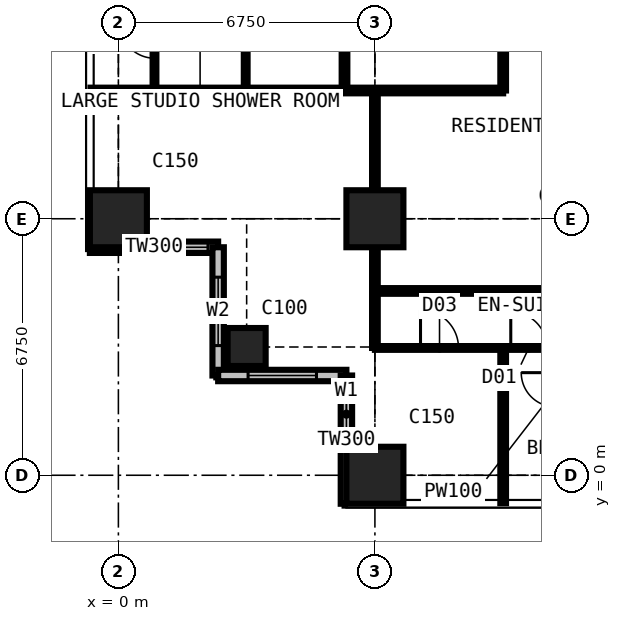
"""IFC4 building model, lengths in metres.
Left out: names, types, materials, properties, quantities, classifications, styles, units other than length and angle.
Written with IfcOpenShell. Run it as: python <this file> out.ifc"""

import sys

from ifc_helpers import new_model, si_unit, direction, frame, frame_2d, origin, origin_2d, place, context, subcontext, project, spatial, rectangle, extrude, element, fill, save


model = new_model("IFC4")
c1 = context("Model", 3, precision=1e-05, world=origin(), true_north=direction((0.0, 1.0)))
c2 = subcontext(c1, "Body", "Model", "MODEL_VIEW")
j1 = project(units=[si_unit("LENGTHUNIT", "METRE"), si_unit("PLANEANGLEUNIT", "RADIAN")], contexts=[c1])
p1 = place(None, origin())
s1 = spatial("IfcSite", under=j1, at=p1, CompositionType="ELEMENT")
p2 = place(p1, origin())
s2 = spatial("IfcBuilding", under=s1, at=p2, CompositionType="ELEMENT")
p3 = place(p2, frame((0.0, 0.0, 119.7)))
s3 = spatial("IfcBuildingStorey", under=s2, at=p3, CompositionType="ELEMENT", Elevation=119.7)
p4 = place(p3, frame((0.0, 6.75, 0.0), z_axis=(0.0, 0.0, 1.0), x_axis=(1.0, 0.0, 0.0)))
e1 = element("IfcColumn", 1, at=p4, inside=s3, PredefinedType="COLUMN", context=c2, shape_type="SweptSolid", body=[
    extrude(rectangle(XDim=1.5, YDim=1.5, at=origin_2d()), origin(), (0.0, 0.0, 1.0), 3.6),
])
p5 = place(p3, frame((3.375, 3.375, 0.0), z_axis=(0.0, 0.0, 1.0), x_axis=(1.0, 0.0, 0.0)))
e2 = element("IfcColumn", 2, at=p5, inside=s3, PredefinedType="COLUMN", context=c2, shape_type="SweptSolid", body=[
    extrude(rectangle(XDim=1.0, YDim=1.0, at=origin_2d()), origin(), (0.0, 0.0, 1.0), 3.6),
])
for number, where, z_axis, x_axis in (
    (3, (6.75, 0.0, 0.0), (0.0, 0.0, 1.0), (1.0, 0.0, 0.0)),
    (4, (6.75, 6.75, 0.0), (0.0, 0.0, 1.0), (1.0, 0.0, 0.0)),
):
    element("IfcColumn", number, at=place(p3, frame(where, z_axis=z_axis, x_axis=x_axis)), inside=s3, PredefinedType="COLUMN", context=c2, shape_type="SweptSolid", body=[
        extrude(rectangle(XDim=1.5, YDim=1.5, at=origin_2d()), origin(), (0.0, 0.0, 1.0), 3.6),
    ])
p6 = place(p3, frame((-0.75, 6.0, 0.0), z_axis=(0.0, 0.0, 1.0), x_axis=(1.0, 0.0, 0.0)))
e5 = element("IfcWall", 5, at=p6, inside=s3, PredefinedType="SOLIDWALL", context=c2, shape_type="SweptSolid", body=[
    extrude(rectangle(XDim=3.375, YDim=0.3, at=frame_2d((1.688, 0.0))), origin(), (0.0, 0.0, 1.0), 3.375),
])
p7 = place(p6, frame((1.607, 0.0, 0.9)))
e6 = element("IfcOpeningElement", 6, at=p7, cuts=e5, PredefinedType="OPENING", context=c2, shape_type="SweptSolid", body=[
    extrude(rectangle(XDim=1.5, YDim=1.8, at=frame_2d((0.75, 0.9))), frame((0.0, 0.16, 0.0), z_axis=(0.0, -1.0, 0.0), x_axis=(1.0, 0.0, 0.0)), (0.0, 0.0, 1.0), 0.32),
])
p8 = place(p3, frame((2.625, 6.0, 0.0), z_axis=(0.0, 0.0, 1.0), x_axis=(0.0, -1.0, 0.0)))
e7 = element("IfcWall", 7, at=p8, inside=s3, PredefinedType="SOLIDWALL", context=c2, shape_type="SweptSolid", body=[
    extrude(rectangle(XDim=3.375, YDim=0.3, at=frame_2d((1.688, 0.0))), origin(), (0.0, 0.0, 1.0), 3.375),
])
p9 = place(p8, frame((0.788, 0.0, 0.6)))
e8 = element("IfcOpeningElement", 8, at=p9, cuts=e7, PredefinedType="OPENING", context=c2, shape_type="SweptSolid", body=[
    extrude(rectangle(XDim=1.8, YDim=2.1, at=frame_2d((0.9, 1.05))), frame((0.0, 0.16, 0.0), z_axis=(0.0, -1.0, 0.0), x_axis=(1.0, 0.0, 0.0)), (0.0, 0.0, 1.0), 0.32),
])
p10 = place(p3, frame((2.625, 2.625, 0.0), z_axis=(0.0, 0.0, 1.0), x_axis=(1.0, 0.0, 0.0)))
e9 = element("IfcWall", 9, at=p10, inside=s3, PredefinedType="SOLIDWALL", context=c2, shape_type="SweptSolid", body=[
    extrude(rectangle(XDim=3.375, YDim=0.3, at=frame_2d((1.688, 0.0))), origin(), (0.0, 0.0, 1.0), 3.375),
])
p11 = place(p10, frame((0.788, 0.0, 0.6)))
e10 = element("IfcOpeningElement", 10, at=p11, cuts=e9, PredefinedType="OPENING", context=c2, shape_type="SweptSolid", body=[
    extrude(rectangle(XDim=1.8, YDim=2.1, at=frame_2d((0.9, 1.05))), frame((0.0, 0.16, 0.0), z_axis=(0.0, -1.0, 0.0), x_axis=(1.0, 0.0, 0.0)), (0.0, 0.0, 1.0), 0.32),
])
p12 = place(p3, frame((6.0, 2.625, 0.0), z_axis=(0.0, 0.0, 1.0), x_axis=(0.0, -1.0, 0.0)))
e11 = element("IfcWall", 11, at=p12, inside=s3, PredefinedType="SOLIDWALL", context=c2, shape_type="SweptSolid", body=[
    extrude(rectangle(XDim=3.375, YDim=0.3, at=frame_2d((1.688, 0.0))), origin(), (0.0, 0.0, 1.0), 3.375),
])
p13 = place(p12, frame((0.268, 0.0, 0.9)))
e12 = element("IfcOpeningElement", 12, at=p13, cuts=e11, PredefinedType="OPENING", context=c2, shape_type="SweptSolid", body=[
    extrude(rectangle(XDim=1.5, YDim=1.8, at=frame_2d((0.75, 0.9))), frame((0.0, 0.16, 0.0), z_axis=(0.0, -1.0, 0.0), x_axis=(1.0, 0.0, 0.0)), (0.0, 0.0, 1.0), 0.32),
])
p14 = place(p3, frame((-0.734, 10.125, 0.0), z_axis=(0.0, 0.0, 1.0), x_axis=(1.0, 0.0, 0.0)))
e13 = element("IfcWall", 13, at=p14, inside=s3, PredefinedType="PARTITIONING", context=c2, shape_type="SweptSolid", body=[
    extrude(rectangle(XDim=10.859, YDim=0.15, at=frame_2d((5.429, 0.0))), origin(), (0.0, 0.0, 1.0), 3.375),
])
p15 = place(p3, frame((0.95, 10.125, 0.0), z_axis=(0.0, 0.0, 1.0), x_axis=(0.0, 1.0, 0.0)))
e14 = element("IfcWall", 14, at=p15, inside=s3, PredefinedType="PARTITIONING", context=c2, shape_type="SweptSolid", body=[
    extrude(rectangle(XDim=2.6, YDim=0.1, at=frame_2d((1.3, 0.0))), origin(), (0.0, 0.0, 1.0), 3.375),
])
p16 = place(p15, frame((0.85, 0.0, 0.0)))
e15 = element("IfcOpeningElement", 15, at=p16, cuts=e14, PredefinedType="OPENING", context=c2, shape_type="SweptSolid", body=[
    extrude(rectangle(XDim=0.9, YDim=2.2, at=frame_2d((0.45, 1.1))), frame((0.0, 0.06, 0.0), z_axis=(0.0, -1.0, 0.0), x_axis=(1.0, 0.0, 0.0)), (0.0, 0.0, 1.0), 0.12),
])
p17 = place(p3, frame((3.35, 10.125, 0.0), z_axis=(0.0, 0.0, 1.0), x_axis=(0.0, 1.0, 0.0)))
e16 = element("IfcWall", 16, at=p17, inside=s3, PredefinedType="PARTITIONING", context=c2, shape_type="SweptSolid", body=[
    extrude(rectangle(XDim=16.875, YDim=0.1, at=frame_2d((8.438, 0.0))), origin(), (0.0, 0.0, 1.0), 3.375),
])
p18 = place(p17, frame((4.2, 0.0, 0.0)))
e17 = element("IfcOpeningElement", 17, at=p18, cuts=e16, PredefinedType="OPENING", context=c2, shape_type="SweptSolid", body=[
    extrude(rectangle(XDim=0.95, YDim=2.2, at=frame_2d((0.475, 1.1))), frame((0.0, 0.06, 0.0), z_axis=(0.0, -1.0, 0.0), x_axis=(1.0, 0.0, 0.0)), (0.0, 0.0, 1.0), 0.12),
])
p19 = place(p17, frame((10.95, 0.0, 0.0)))
e18 = element("IfcOpeningElement", 18, at=p19, cuts=e16, PredefinedType="OPENING", context=c2, shape_type="SweptSolid", body=[
    extrude(rectangle(XDim=0.95, YDim=2.2, at=frame_2d((0.475, 1.1))), frame((0.0, 0.06, 0.0), z_axis=(0.0, -1.0, 0.0), x_axis=(1.0, 0.0, 0.0)), (0.0, 0.0, 1.0), 0.12),
])
p20 = place(p3, frame((5.95, 10.125, 0.0), z_axis=(0.0, 0.0, 1.0), x_axis=(0.0, 1.0, 0.0)))
e19 = element("IfcWall", 19, at=p20, inside=s3, PredefinedType="PARTITIONING", context=c2, shape_type="SweptSolid", body=[
    extrude(rectangle(XDim=2.65, YDim=0.15, at=frame_2d((1.325, 0.0))), origin(), (0.0, 0.0, 1.0), 3.375),
])
p21 = place(p3, frame((6.75, 3.35, 0.0), z_axis=(0.0, 0.0, 1.0), x_axis=(0.0, 1.0, 0.0)))
e20 = element("IfcWall", 20, at=p21, inside=s3, PredefinedType="PARTITIONING", context=c2, shape_type="SweptSolid", body=[
    extrude(rectangle(XDim=6.775, YDim=0.15, at=frame_2d((3.387, 0.0))), origin(), (0.0, 0.0, 1.0), 2.877),
])
p22 = place(p3, frame((6.75, 3.35, 0.0), z_axis=(0.0, 0.0, 1.0), x_axis=(1.0, 0.0, 0.0)))
e21 = element("IfcWall", 21, at=p22, inside=s3, PredefinedType="PARTITIONING", context=c2, shape_type="SweptSolid", body=[
    extrude(rectangle(XDim=23.625, YDim=0.1, at=frame_2d((11.812, 0.0))), origin(), (0.0, 0.0, 1.0), 3.375),
])
p23 = place(p22, frame((1.2, 0.0, 0.0)))
e22 = element("IfcOpeningElement", 22, at=p23, cuts=e21, PredefinedType="OPENING", context=c2, shape_type="SweptSolid", body=[
    extrude(rectangle(XDim=1.0, YDim=2.2, at=frame_2d((0.5, 1.1))), frame((0.0, 0.06, 0.0), z_axis=(0.0, -1.0, 0.0), x_axis=(1.0, 0.0, 0.0)), (0.0, 0.0, 1.0), 0.12),
])
p24 = place(p22, frame((3.575, 0.0, 0.0)))
e23 = element("IfcOpeningElement", 23, at=p24, cuts=e21, PredefinedType="OPENING", context=c2, shape_type="SweptSolid", body=[
    extrude(rectangle(XDim=0.95, YDim=2.2, at=frame_2d((0.475, 1.1))), frame((0.0, 0.06, 0.0), z_axis=(0.0, -1.0, 0.0), x_axis=(1.0, 0.0, 0.0)), (0.0, 0.0, 1.0), 0.12),
])
p25 = place(p22, frame((6.95, 0.0, 0.0)))
e24 = element("IfcOpeningElement", 24, at=p25, cuts=e21, PredefinedType="OPENING", context=c2, shape_type="SweptSolid", body=[
    extrude(rectangle(XDim=0.95, YDim=2.2, at=frame_2d((0.475, 1.1))), frame((0.0, 0.06, 0.0), z_axis=(0.0, -1.0, 0.0), x_axis=(1.0, 0.0, 0.0)), (0.0, 0.0, 1.0), 0.12),
])
p26 = place(p22, frame((10.325, 0.0, 0.0)))
e25 = element("IfcOpeningElement", 25, at=p26, cuts=e21, PredefinedType="OPENING", context=c2, shape_type="SweptSolid", body=[
    extrude(rectangle(XDim=0.95, YDim=2.2, at=frame_2d((0.475, 1.1))), frame((0.0, 0.06, 0.0), z_axis=(0.0, -1.0, 0.0), x_axis=(1.0, 0.0, 0.0)), (0.0, 0.0, 1.0), 0.12),
])
p27 = place(p22, frame((18.475, 0.0, 0.0)))
e26 = element("IfcOpeningElement", 26, at=p27, cuts=e21, PredefinedType="OPENING", context=c2, shape_type="SweptSolid", body=[
    extrude(rectangle(XDim=0.95, YDim=2.2, at=frame_2d((0.475, 1.1))), frame((0.0, 0.06, 0.0), z_axis=(0.0, -1.0, 0.0), x_axis=(1.0, 0.0, 0.0)), (0.0, 0.0, 1.0), 0.12),
])
p28 = place(p22, frame((13.7, 0.0, 0.0)))
e27 = element("IfcOpeningElement", 27, at=p28, cuts=e21, PredefinedType="OPENING", context=c2, shape_type="SweptSolid", body=[
    extrude(rectangle(XDim=0.95, YDim=2.2, at=frame_2d((0.475, 1.1))), frame((0.0, 0.06, 0.0), z_axis=(0.0, -1.0, 0.0), x_axis=(1.0, 0.0, 0.0)), (0.0, 0.0, 1.0), 0.12),
])
p29 = place(p3, frame((6.75, 4.85, 0.0), z_axis=(0.0, 0.0, 1.0), x_axis=(1.0, 0.0, 0.0)))
e28 = element("IfcWall", 28, at=p29, inside=s3, PredefinedType="PARTITIONING", context=c2, shape_type="SweptSolid", body=[
    extrude(rectangle(XDim=11.05, YDim=0.15, at=frame_2d((5.525, 0.0))), origin(), (0.0, 0.0, 1.0), 3.375),
])
p30 = place(p3, frame((10.125, -0.734, 0.0), z_axis=(0.0, 0.0, 1.0), x_axis=(0.0, 1.0, 0.0)))
e29 = element("IfcWall", 29, at=p30, inside=s3, PredefinedType="PARTITIONING", context=c2, shape_type="SweptSolid", body=[
    extrude(rectangle(XDim=4.084, YDim=0.15, at=frame_2d((2.042, 0.0))), origin(), (0.0, 0.0, 1.0), 3.375),
])
p31 = place(p3, frame((10.125, 10.125, 0.0), z_axis=(0.0, 0.0, 1.0), x_axis=(0.0, 1.0, 0.0)))
e30 = element("IfcWall", 30, at=p31, inside=s3, PredefinedType="PARTITIONING", context=c2, shape_type="SweptSolid", body=[
    extrude(rectangle(XDim=1.175, YDim=0.15, at=frame_2d((0.587, 0.0))), origin(), (0.0, 0.0, 1.0), 3.375),
])
p32 = place(p7, origin())
e31 = element("IfcWindow", 31, at=p32, inside=s3, PartitioningType="SINGLE_PANEL", PredefinedType="WINDOW", context=c2, shape_type="SweptSolid", body=[
    extrude(rectangle(XDim=1.5, YDim=1.8, at=frame_2d((0.75, 0.9))), frame((0.0, 0.03, 0.0), z_axis=(0.0, -1.0, 0.0), x_axis=(1.0, 0.0, 0.0)), (0.0, 0.0, 1.0), 0.06),
])
fill(e6, e31)
p33 = place(p9, origin())
e32 = element("IfcWindow", 32, at=p33, inside=s3, PartitioningType="SINGLE_PANEL", PredefinedType="WINDOW", context=c2, shape_type="SweptSolid", body=[
    extrude(rectangle(XDim=1.8, YDim=2.1, at=frame_2d((0.9, 1.05))), frame((0.0, 0.03, 0.0), z_axis=(0.0, -1.0, 0.0), x_axis=(1.0, 0.0, 0.0)), (0.0, 0.0, 1.0), 0.06),
])
fill(e8, e32)
p34 = place(p11, origin())
e33 = element("IfcWindow", 33, at=p34, inside=s3, PartitioningType="SINGLE_PANEL", PredefinedType="WINDOW", context=c2, shape_type="SweptSolid", body=[
    extrude(rectangle(XDim=1.8, YDim=2.1, at=frame_2d((0.9, 1.05))), frame((0.0, 0.03, 0.0), z_axis=(0.0, -1.0, 0.0), x_axis=(1.0, 0.0, 0.0)), (0.0, 0.0, 1.0), 0.06),
])
fill(e10, e33)
p35 = place(p13, origin())
e34 = element("IfcWindow", 34, at=p35, inside=s3, PartitioningType="SINGLE_PANEL", PredefinedType="WINDOW", context=c2, shape_type="SweptSolid", body=[
    extrude(rectangle(XDim=1.5, YDim=1.8, at=frame_2d((0.75, 0.9))), frame((0.0, 0.03, 0.0), z_axis=(0.0, -1.0, 0.0), x_axis=(1.0, 0.0, 0.0)), (0.0, 0.0, 1.0), 0.06),
])
fill(e12, e34)
p36 = place(p23, origin())
e35 = element("IfcDoor", 35, at=p36, inside=s3, OperationType="SINGLE_SWING_LEFT", PredefinedType="DOOR", context=c2, shape_type="SweptSolid", body=[
    extrude(rectangle(XDim=1.0, YDim=2.2, at=frame_2d((0.5, 1.1))), frame((0.0, 0.025, 0.0), z_axis=(0.0, -1.0, 0.0), x_axis=(1.0, 0.0, 0.0)), (0.0, 0.0, 1.0), 0.05),
])
fill(e22, e35)
p37 = place(p24, origin())
e36 = element("IfcDoor", 36, at=p37, inside=s3, OperationType="SINGLE_SWING_LEFT", PredefinedType="DOOR", context=c2, shape_type="SweptSolid", body=[
    extrude(rectangle(XDim=0.95, YDim=2.2, at=frame_2d((0.475, 1.1))), frame((0.0, 0.025, 0.0), z_axis=(0.0, -1.0, 0.0), x_axis=(1.0, 0.0, 0.0)), (0.0, 0.0, 1.0), 0.05),
])
fill(e23, e36)
p38 = place(p16, origin())
e37 = element("IfcDoor", 37, at=p38, inside=s3, OperationType="SINGLE_SWING_RIGHT", PredefinedType="DOOR", context=c2, shape_type="SweptSolid", body=[
    extrude(rectangle(XDim=0.9, YDim=2.2, at=frame_2d((0.45, 1.1))), frame((0.0, 0.025, 0.0), z_axis=(0.0, -1.0, 0.0), x_axis=(1.0, 0.0, 0.0)), (0.0, 0.0, 1.0), 0.05),
])
fill(e15, e37)
save(model, sys.argv[1])
